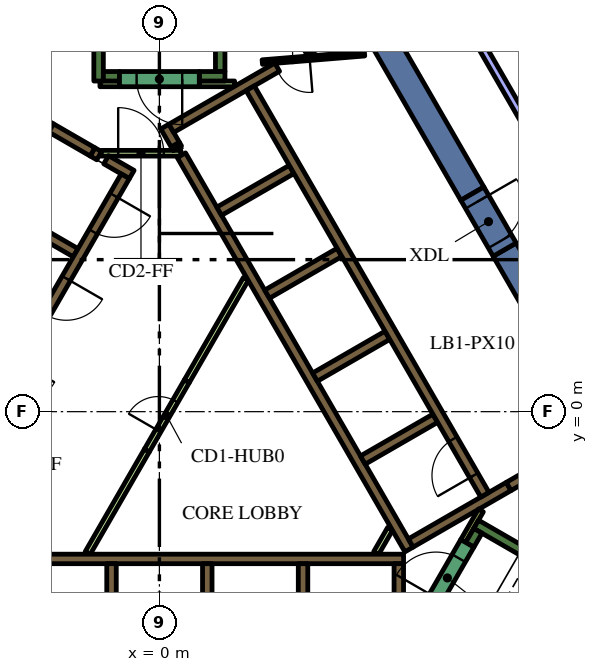
"""IFC4 building model, lengths in metres.
Left out: names, types, materials, properties, quantities, classifications, styles, units other than length and angle.
Written with IfcOpenShell. Run it as: python <this file> out.ifc"""

import sys

from ifc_helpers import new_model, si_unit, direction, frame, frame_2d, origin, place, context, subcontext, project, spatial, rectangle, extrude, element, fill, save


model = new_model("IFC4")
c1 = context("Model", 3, precision=1e-05, world=origin(), true_north=direction((0.0, 1.0)))
c2 = subcontext(c1, "Body", "Model", "MODEL_VIEW")
j1 = project(units=[si_unit("LENGTHUNIT", "METRE"), si_unit("PLANEANGLEUNIT", "RADIAN")], contexts=[c1])
p1 = place(None, origin())
s1 = spatial("IfcSite", under=j1, at=p1, CompositionType="ELEMENT")
p2 = place(p1, origin())
s2 = spatial("IfcBuilding", under=s1, at=p2, CompositionType="ELEMENT")
p3 = place(p2, frame((0.0, 0.0, 235.2)))
s3 = spatial("IfcBuildingStorey", under=s2, at=p3, CompositionType="ELEMENT", Elevation=235.2)
for number, where, z_axis, x_axis in (
    (1, (9.085, 4.264, 0.0), (0.0, 0.0, 1.0), (0.5, -0.866, 0.0)),
    (2, (8.235, 5.736, 0.0), (0.0, 0.0, 1.0), (-0.5, 0.866, 0.0)),
):
    element("IfcWall", number, at=place(p3, frame(where, z_axis=z_axis, x_axis=x_axis)), inside=s3, PredefinedType="SOLIDWALL", context=c2, shape_type="SweptSolid", body=[
        extrude(rectangle(XDim=12.472, YDim=0.7, at=frame_2d((6.236, 0.0))), origin(), (0.0, 0.0, 1.0), 4.2),
    ])
p4 = place(p3, frame((8.334, -2.964, 0.0), z_axis=(0.0, 0.0, 1.0), x_axis=(0.866016039709, -0.500016218704, 0.0)))
e3 = element("IfcWall", 3, at=p4, inside=s3, PredefinedType="SOLIDWALL", context=c2, shape_type="SweptSolid", body=[
    extrude(rectangle(XDim=7.05, YDim=0.25, at=frame_2d((3.525, 0.0))), origin(), (0.0, 0.0, 1.0), 4.2),
])
p5 = place(p3, frame((8.168, -3.503, 0.0), z_axis=(0.0, 0.0, 1.0), x_axis=(0.49972245349, 0.866185586049, 0.0)))
e4 = element("IfcWall", 4, at=p5, inside=s3, PredefinedType="SOLIDWALL", context=c2, shape_type="SweptSolid", body=[
    extrude(rectangle(XDim=0.425, YDim=0.25, at=frame_2d((0.212, 0.0))), origin(), (0.0, 0.0, 1.0), 4.2),
])
p6 = place(p3, frame((1.6, 8.95, 0.0), z_axis=(0.0, 0.0, 1.0), x_axis=(0.0, 1.0, 0.0)))
e5 = element("IfcWall", 5, at=p6, inside=s3, PredefinedType="SOLIDWALL", context=c2, shape_type="SweptSolid", body=[
    extrude(rectangle(XDim=6.8, YDim=0.25, at=frame_2d((3.4, 0.0))), origin(), (0.0, 0.0, 1.0), 4.2),
])
p7 = place(p3, frame((1.05, 8.825, 0.0), z_axis=(0.0, 0.0, 1.0), x_axis=(1.0, 0.0, 0.0)))
e6 = element("IfcWall", 6, at=p7, inside=s3, PredefinedType="SOLIDWALL", context=c2, shape_type="SweptSolid", body=[
    extrude(rectangle(XDim=0.675, YDim=0.25, at=frame_2d((0.337, 0.0))), origin(), (0.0, 0.0, 1.0), 4.2),
])
p8 = place(p3, frame((-1.6, 8.7, 0.0), z_axis=(0.0, 0.0, 1.0), x_axis=(0.0, 1.0, 0.0)))
e7 = element("IfcWall", 7, at=p8, inside=s3, PredefinedType="SOLIDWALL", context=c2, shape_type="SweptSolid", body=[
    extrude(rectangle(XDim=7.05, YDim=0.25, at=frame_2d((3.525, 0.0))), origin(), (0.0, 0.0, 1.0), 4.2),
])
p9 = place(p3, frame((-1.475, 8.825, 0.0), z_axis=(0.0, 0.0, 1.0), x_axis=(1.0, 0.0, 0.0)))
e8 = element("IfcWall", 8, at=p9, inside=s3, PredefinedType="SOLIDWALL", context=c2, shape_type="SweptSolid", body=[
    extrude(rectangle(XDim=0.425, YDim=0.25, at=frame_2d((0.212, 0.0))), origin(), (0.0, 0.0, 1.0), 4.2),
])
p10 = place(p3, frame((-5.545, -3.875, 0.0), z_axis=(0.0, 0.0, 1.0), x_axis=(1.0, 0.0, 0.0)))
e9 = element("IfcWall", 9, at=p10, inside=s3, PredefinedType="SOLIDWALL", context=c2, shape_type="SweptSolid", body=[
    extrude(rectangle(XDim=11.97, YDim=0.25, at=frame_2d((5.985, 0.0))), origin(), (0.0, 0.0, 1.0), 4.2),
])
p11 = place(p3, frame((6.3, -7.24, 0.0), z_axis=(0.0, 0.0, 1.0), x_axis=(0.0, 1.0, 0.0)))
e10 = element("IfcWall", 10, at=p11, inside=s3, PredefinedType="SOLIDWALL", context=c2, shape_type="SweptSolid", body=[
    extrude(rectangle(XDim=3.24, YDim=0.25, at=frame_2d((1.62, 0.0))), origin(), (0.0, 0.0, 1.0), 4.2),
])
for number, where, z_axis, x_axis in (
    (11, (3.78, -4.0, 0.0), (0.0, 0.0, 1.0), (0.0, -1.0, 0.0)),
    (12, (1.26, -4.0, 0.0), (0.0, 0.0, 1.0), (0.0, -1.0, 0.0)),
    (13, (-1.26, -4.0, 0.0), (0.0, 0.0, 1.0), (0.0, -1.0, 0.0)),
):
    element("IfcWall", number, at=place(p3, frame(where, z_axis=z_axis, x_axis=x_axis)), inside=s3, PredefinedType="SOLIDWALL", context=c2, shape_type="SweptSolid", body=[
        extrude(rectangle(XDim=2.2, YDim=0.25, at=frame_2d((1.1, 0.0))), origin(), (0.0, 0.0, 1.0), 4.2),
    ])
p12 = place(p3, frame((0.473, 6.93, 0.0), z_axis=(0.0, 0.0, 1.0), x_axis=(-0.49972245349, 0.866185586049, 0.0)))
e14 = element("IfcWall", 14, at=p12, inside=s3, PredefinedType="SOLIDWALL", context=c2, shape_type="SweptSolid", body=[
    extrude(rectangle(XDim=0.11, YDim=0.25, at=frame_2d((0.055, 0.0))), origin(), (0.0, 0.0, 1.0), 4.2),
])
p13 = place(p3, frame((6.568, -3.627, 0.0), z_axis=(0.0, 0.0, 1.0), x_axis=(-0.499999455981, 0.866025717874, 0.0)))
e15 = element("IfcWall", 15, at=p13, inside=s3, PredefinedType="SOLIDWALL", context=c2, shape_type="SweptSolid", body=[
    extrude(rectangle(XDim=11.978, YDim=0.25, at=frame_2d((5.989, 0.0))), origin(), (0.0, 0.0, 1.0), 4.2),
])
p14 = place(p3, frame((0.417, 7.027, 0.0), z_axis=(0.0, 0.0, 1.0), x_axis=(-0.500210807569, 0.865903659763, 0.0)))
e16 = element("IfcWall", 16, at=p14, inside=s3, PredefinedType="SOLIDWALL", context=c2, shape_type="SweptSolid", body=[
    extrude(rectangle(XDim=0.548, YDim=0.25, at=frame_2d((0.274, 0.0))), origin(), (0.0, 0.0, 1.0), 4.2),
])
p15 = place(p3, frame((3.1, 9.064, 0.0), z_axis=(0.0, 0.0, 1.0), x_axis=(-0.866030133475, -0.499991807846, 0.0)))
e17 = element("IfcWall", 17, at=p15, inside=s3, PredefinedType="SOLIDWALL", context=c2, shape_type="SweptSolid", body=[
    extrude(rectangle(XDim=3.217, YDim=0.25, at=frame_2d((1.608, 0.0))), origin(), (0.0, 0.0, 1.0), 4.2),
])
p16 = place(p3, frame((1.574, 5.274, 0.0), z_axis=(0.0, 0.0, 1.0), x_axis=(0.866028486751, 0.499994660107, 0.0)))
e18 = element("IfcWall", 18, at=p16, inside=s3, PredefinedType="SOLIDWALL", context=c2, shape_type="SweptSolid", body=[
    extrude(rectangle(XDim=2.2, YDim=0.25, at=frame_2d((1.1, 0.0))), origin(), (0.0, 0.0, 1.0), 4.2),
])
for number, where, z_axis, x_axis in (
    (19, (2.834, 3.091, 0.0), (0.0, 0.0, 1.0), (0.866, 0.5, 0.0)),
    (20, (4.094, 0.909, 0.0), (0.0, 0.0, 1.0), (0.866, 0.5, 0.0)),
    (21, (5.354, -1.274, 0.0), (0.0, 0.0, 1.0), (0.866, 0.5, 0.0)),
):
    element("IfcWall", number, at=place(p3, frame(where, z_axis=z_axis, x_axis=x_axis)), inside=s3, PredefinedType="SOLIDWALL", context=c2, shape_type="SweptSolid", body=[
        extrude(rectangle(XDim=2.2, YDim=0.25, at=frame_2d((1.1, 0.0))), origin(), (0.0, 0.0, 1.0), 4.2),
    ])
p17 = place(p3, frame((6.614, -3.456, 0.0), z_axis=(0.0, 0.0, 1.0), x_axis=(0.866032512851, 0.499987686533, 0.0)))
e22 = element("IfcWall", 22, at=p17, inside=s3, PredefinedType="SOLIDWALL", context=c2, shape_type="SweptSolid", body=[
    extrude(rectangle(XDim=2.975, YDim=0.25, at=frame_2d((1.487, 0.0))), origin(), (0.0, 0.0, 1.0), 4.2),
])
p18 = place(p3, frame((3.83, 9.486, 0.0), z_axis=(0.0, 0.0, 1.0), x_axis=(0.865986202621, 0.500067892261, 0.0)))
e23 = element("IfcWall", 23, at=p18, inside=s3, PredefinedType="SOLIDWALL", context=c2, shape_type="SweptSolid", body=[
    extrude(rectangle(XDim=1.591, YDim=0.25, at=frame_2d((0.795, 0.0))), origin(), (0.0, 0.0, 1.0), 4.2),
])
p19 = place(p3, frame((-8.06, -1.311, 0.0), z_axis=(0.0, 0.0, 1.0), x_axis=(0.50000273126, 0.866023826885, 0.0)))
e24 = element("IfcWall", 24, at=p19, inside=s3, PredefinedType="SOLIDWALL", context=c2, shape_type="SweptSolid", body=[
    extrude(rectangle(XDim=10.33, YDim=0.25, at=frame_2d((5.165, 0.0))), origin(), (0.0, 0.0, 1.0), 4.2),
])
p20 = place(p3, frame((-1.758, 6.835, 0.0), z_axis=(0.0, 0.0, 1.0), x_axis=(0.865982457891, -0.500074377092, 0.0)))
e25 = element("IfcWall", 25, at=p20, inside=s3, PredefinedType="SOLIDWALL", context=c2, shape_type="SweptSolid", body=[
    extrude(rectangle(XDim=0.2, YDim=0.25, at=frame_2d((0.1, 0.0))), origin(), (0.0, 0.0, 1.0), 4.2),
])
p21 = place(p3, frame((-1.76, 6.836, 0.0), z_axis=(0.0, 0.0, 1.0), x_axis=(-0.865952863304, 0.500125622755, 0.0)))
e26 = element("IfcWall", 26, at=p21, inside=s3, PredefinedType="SOLIDWALL", context=c2, shape_type="SweptSolid", body=[
    extrude(rectangle(XDim=1.258, YDim=0.25, at=frame_2d((0.629, 0.0))), origin(), (0.0, 0.0, 1.0), 4.2),
])
p22 = place(p3, frame((-0.728, 6.24, 0.0), z_axis=(0.0, 0.0, 1.0), x_axis=(-0.865955664968, 0.500120771724, 0.0)))
e27 = element("IfcWall", 27, at=p22, inside=s3, PredefinedType="SOLIDWALL", context=c2, shape_type="SweptSolid", body=[
    extrude(rectangle(XDim=0.778, YDim=0.25, at=frame_2d((0.389, 0.0))), origin(), (0.0, 0.0, 1.0), 4.2),
])
p23 = place(p3, frame((-2.204, 4.182, 0.0), z_axis=(0.0, 0.0, 1.0), x_axis=(-0.866008176907, 0.50002983664, 0.0)))
e28 = element("IfcWall", 28, at=p23, inside=s3, PredefinedType="SOLIDWALL", context=c2, shape_type="SweptSolid", body=[
    extrude(rectangle(XDim=2.2, YDim=0.25, at=frame_2d((1.1, 0.0))), origin(), (0.0, 0.0, 1.0), 4.2),
])
p24 = place(p3, frame((1.05, 8.625, 0.0), z_axis=(0.0, 0.0, 1.0), x_axis=(1.0, 0.0, 0.0)))
e29 = element("IfcWall", 29, at=p24, inside=s3, PredefinedType="PARTITIONING", context=c2, shape_type="SweptSolid", body=[
    extrude(rectangle(XDim=0.929, YDim=0.15, at=frame_2d((0.464, 0.0))), origin(), (0.0, 0.0, 1.0), 3.45),
])
p25 = place(p3, frame((-1.564, 8.625, 0.0), z_axis=(0.0, 0.0, 1.0), x_axis=(1.0, 0.0, 0.0)))
e30 = element("IfcWall", 30, at=p25, inside=s3, PredefinedType="PARTITIONING", context=c2, shape_type="SweptSolid", body=[
    extrude(rectangle(XDim=0.514, YDim=0.15, at=frame_2d((0.257, 0.0))), origin(), (0.0, 0.0, 1.0), 3.45),
])
p26 = place(p3, frame((8.459, -2.599, 0.0), z_axis=(0.0, 0.0, 1.0), x_axis=(-0.500041054325, -0.866001699761, 0.0)))
e31 = element("IfcWall", 31, at=p26, inside=s3, PredefinedType="PARTITIONING", context=c2, shape_type="SweptSolid", body=[
    extrude(rectangle(XDim=0.929, YDim=0.15, at=frame_2d((0.464, 0.0))), origin(), (0.0, 0.0, 1.0), 4.2),
])
p27 = place(p3, frame((5.705, -3.718, 0.0), z_axis=(0.0, 0.0, 1.0), x_axis=(0.499962090823, 0.866047289552, 0.0)))
e32 = element("IfcWall", 32, at=p27, inside=s3, PredefinedType="PARTITIONING", context=c2, shape_type="SweptSolid", body=[
    extrude(rectangle(XDim=0.735, YDim=0.15, at=frame_2d((0.367, 0.0))), origin(), (0.0, 0.0, 1.0), 3.45),
])
p28 = place(p3, frame((-1.887, -3.718, 0.0), z_axis=(0.0, 0.0, 1.0), x_axis=(0.500043732237, 0.866000153493, 0.0)))
e33 = element("IfcWall", 33, at=p28, inside=s3, PredefinedType="PARTITIONING", context=c2, shape_type="SweptSolid", body=[
    extrude(rectangle(XDim=3.114, YDim=0.15, at=frame_2d((1.557, 0.0))), origin(), (0.0, 0.0, 1.0), 3.45),
])
p29 = place(p3, frame((0.72, 0.797, 0.0), z_axis=(0.0, 0.0, 1.0), x_axis=(0.499984921984, 0.866034108906, 0.0)))
e34 = element("IfcWall", 34, at=p29, inside=s3, PredefinedType="PARTITIONING", context=c2, shape_type="SweptSolid", body=[
    extrude(rectangle(XDim=3.113, YDim=0.15, at=frame_2d((1.557, 0.0))), origin(), (0.0, 0.0, 1.0), 3.45),
])
p30 = place(p3, frame((8.565, -2.185, 0.0), z_axis=(0.0, 0.0, 1.0), x_axis=(-0.499997954832, 0.866026584559, 0.0)))
e35 = element("IfcWall", 35, at=p30, inside=s3, PredefinedType="SOLIDWALL", context=c2, shape_type="SweptSolid", body=[
    extrude(rectangle(XDim=12.35, YDim=0.25, at=frame_2d((6.175, 0.0))), origin(), (0.0, 0.0, 1.0), 4.2),
])
p31 = place(p30, frame((0.585, 0.0, 0.0)))
e36 = element("IfcOpeningElement", 36, at=p31, cuts=e35, PredefinedType="OPENING", context=c2, shape_type="SweptSolid", body=[
    extrude(rectangle(XDim=1.1, YDim=2.1, at=frame_2d((0.55, 1.05))), frame((0.0, 0.135, 0.0), z_axis=(0.0, -1.0, 0.0), x_axis=(1.0, 0.0, 0.0)), (0.0, 0.0, 1.0), 0.27),
])
p32 = place(p3, frame((-0.898, 6.194, 0.0), z_axis=(0.0, 0.0, 1.0), x_axis=(-0.499996202215, -0.866027596426, 0.0)))
e37 = element("IfcWall", 37, at=p32, inside=s3, PredefinedType="SOLIDWALL", context=c2, shape_type="SweptSolid", body=[
    extrude(rectangle(XDim=9.83, YDim=0.25, at=frame_2d((4.915, 0.0))), origin(), (0.0, 0.0, 1.0), 4.2),
])
p33 = place(p32, frame((0.585, 0.0, 0.0)))
e38 = element("IfcOpeningElement", 38, at=p33, cuts=e37, PredefinedType="OPENING", context=c2, shape_type="SweptSolid", body=[
    extrude(rectangle(XDim=1.1, YDim=2.1, at=frame_2d((0.55, 1.05))), frame((0.0, 0.135, 0.0), z_axis=(0.0, -1.0, 0.0), x_axis=(1.0, 0.0, 0.0)), (0.0, 0.0, 1.0), 0.27),
])
p34 = place(p32, frame((3.105, 0.0, 0.0)))
e39 = element("IfcOpeningElement", 39, at=p34, cuts=e37, PredefinedType="OPENING", context=c2, shape_type="SweptSolid", body=[
    extrude(rectangle(XDim=1.1, YDim=2.1, at=frame_2d((0.55, 1.05))), frame((0.0, 0.135, 0.0), z_axis=(0.0, -1.0, 0.0), x_axis=(1.0, 0.0, 0.0)), (0.0, 0.0, 1.0), 0.27),
])
p35 = place(p32, frame((5.625, 0.0, 0.0)))
e40 = element("IfcOpeningElement", 40, at=p35, cuts=e37, PredefinedType="OPENING", context=c2, shape_type="SweptSolid", body=[
    extrude(rectangle(XDim=1.1, YDim=2.1, at=frame_2d((0.55, 1.05))), frame((0.0, 0.135, 0.0), z_axis=(0.0, -1.0, 0.0), x_axis=(1.0, 0.0, 0.0)), (0.0, 0.0, 1.0), 0.27),
])
p36 = place(p32, frame((8.145, 0.0, 0.0)))
e41 = element("IfcOpeningElement", 41, at=p36, cuts=e37, PredefinedType="OPENING", context=c2, shape_type="SweptSolid", body=[
    extrude(rectangle(XDim=1.1, YDim=2.1, at=frame_2d((0.55, 1.05))), frame((0.0, 0.135, 0.0), z_axis=(0.0, -1.0, 0.0), x_axis=(1.0, 0.0, 0.0)), (0.0, 0.0, 1.0), 0.27),
])
p37 = place(p3, frame((7.053, -5.284, 0.0), z_axis=(0.0, 0.0, 1.0), x_axis=(0.500078061341, 0.865980330357, 0.0)))
e42 = element("IfcWall", 42, at=p37, inside=s3, PredefinedType="SOLIDWALL", context=c2, shape_type="SweptSolid", body=[
    extrude(rectangle(XDim=2.1, YDim=0.4, at=frame_2d((1.05, 0.0))), origin(), (0.0, 0.0, 1.0), 4.2),
])
p38 = place(p37, frame((0.45, 0.0, 0.0)))
e43 = element("IfcOpeningElement", 43, at=p38, cuts=e42, PredefinedType="OPENING", context=c2, shape_type="SweptSolid", body=[
    extrude(rectangle(XDim=1.2, YDim=2.1, at=frame_2d((0.6, 1.05))), frame((0.0, 0.21, 0.0), z_axis=(0.0, -1.0, 0.0), x_axis=(1.0, 0.0, 0.0)), (0.0, 0.0, 1.0), 0.42),
])
p39 = place(p3, frame((1.05, 8.75, 0.0), z_axis=(0.0, 0.0, 1.0), x_axis=(-1.0, 0.0, 0.0)))
e44 = element("IfcWall", 44, at=p39, inside=s3, PredefinedType="SOLIDWALL", context=c2, shape_type="SweptSolid", body=[
    extrude(rectangle(XDim=2.1, YDim=0.4, at=frame_2d((1.05, 0.0))), origin(), (0.0, 0.0, 1.0), 4.2),
])
p40 = place(p39, frame((0.45, 0.0, 0.0)))
e45 = element("IfcOpeningElement", 45, at=p40, cuts=e44, PredefinedType="OPENING", context=c2, shape_type="SweptSolid", body=[
    extrude(rectangle(XDim=1.2, YDim=2.1, at=frame_2d((0.6, 1.05))), frame((0.0, 0.21, 0.0), z_axis=(0.0, -1.0, 0.0), x_axis=(1.0, 0.0, 0.0)), (0.0, 0.0, 1.0), 0.42),
])
p41 = place(p3, frame((5.398, 9.419, 0.0), z_axis=(0.0, 0.0, 1.0), x_axis=(-0.996653416376, -0.081743303248, 0.0)))
e46 = element("IfcWall", 46, at=p41, inside=s3, PredefinedType="PARTITIONING", context=c2, shape_type="SweptSolid", body=[
    extrude(rectangle(XDim=2.7, YDim=0.12, at=frame_2d((1.35, 0.0))), origin(), (0.0, 0.0, 1.0), 3.45),
])
p42 = place(p41, frame((1.45, 0.0, 0.0)))
e47 = element("IfcOpeningElement", 47, at=p42, cuts=e46, PredefinedType="OPENING", context=c2, shape_type="SweptSolid", body=[
    extrude(rectangle(XDim=0.9, YDim=2.1, at=frame_2d((0.45, 1.05))), frame((0.0, 0.07, 0.0), z_axis=(0.0, -1.0, 0.0), x_axis=(1.0, 0.0, 0.0)), (0.0, 0.0, 1.0), 0.14),
])
p43 = place(p3, frame((-0.33, -1.022, 0.0), z_axis=(0.0, 0.0, 1.0), x_axis=(0.500027713859, 0.866009402589, 0.0)))
e48 = element("IfcWall", 48, at=p43, inside=s3, PredefinedType="PARTITIONING", context=c2, shape_type="SweptSolid", body=[
    extrude(rectangle(XDim=2.1, YDim=0.15, at=frame_2d((1.05, 0.0))), origin(), (0.0, 0.0, 1.0), 3.45),
])
p44 = place(p43, frame((0.6, 0.0, 0.0)))
e49 = element("IfcOpeningElement", 49, at=p44, cuts=e48, PredefinedType="OPENING", context=c2, shape_type="SweptSolid", body=[
    extrude(rectangle(XDim=0.9, YDim=2.1, at=frame_2d((0.45, 1.05))), frame((0.0, 0.085, 0.0), z_axis=(0.0, -1.0, 0.0), x_axis=(1.0, 0.0, 0.0)), (0.0, 0.0, 1.0), 0.17),
])
p45 = place(p3, frame((-1.534, 6.8, 0.0), z_axis=(0.0, 0.0, 1.0), x_axis=(1.0, 0.0, 0.0)))
e50 = element("IfcWall", 50, at=p45, inside=s3, PredefinedType="PARTITIONING", context=c2, shape_type="SweptSolid", body=[
    extrude(rectangle(XDim=2.1, YDim=0.15, at=frame_2d((1.05, 0.0))), origin(), (0.0, 0.0, 1.0), 3.45),
])
p46 = place(p45, frame((0.45, 0.0, 0.0)))
e51 = element("IfcOpeningElement", 51, at=p46, cuts=e50, PredefinedType="OPENING", context=c2, shape_type="SweptSolid", body=[
    extrude(rectangle(XDim=1.2, YDim=2.1, at=frame_2d((0.6, 1.05))), frame((0.0, 0.085, 0.0), z_axis=(0.0, -1.0, 0.0), x_axis=(1.0, 0.0, 0.0)), (0.0, 0.0, 1.0), 0.17),
])
p47 = place(p3, frame((11.009, -0.919, 0.0), z_axis=(0.0, 0.0, 1.0), x_axis=(-0.866059744384, -0.49994051562, 0.0)))
e52 = element("IfcWall", 52, at=p47, inside=s3, PredefinedType="SOLIDWALL", context=c2, shape_type="SweptSolid", body=[
    extrude(rectangle(XDim=2.1, YDim=0.25, at=frame_2d((1.05, 0.0))), origin(), (0.0, 0.0, 1.0), 4.2),
])
p48 = place(p47, frame((0.45, 0.0, 0.0)))
e53 = element("IfcOpeningElement", 53, at=p48, cuts=e52, PredefinedType="OPENING", context=c2, shape_type="SweptSolid", body=[
    extrude(rectangle(XDim=1.2, YDim=2.1, at=frame_2d((0.6, 1.05))), frame((0.0, 0.135, 0.0), z_axis=(0.0, -1.0, 0.0), x_axis=(1.0, 0.0, 0.0)), (0.0, 0.0, 1.0), 0.27),
])
p49 = place(p3, frame((8.235, 5.736, 0.0), z_axis=(0.0, 0.0, 1.0), x_axis=(0.499954529098, -0.86605165483, 0.0)))
e54 = element("IfcWall", 54, at=p49, inside=s3, PredefinedType="SOLIDWALL", context=c2, shape_type="SweptSolid", body=[
    extrude(rectangle(XDim=1.7, YDim=0.7, at=frame_2d((0.85, 0.0))), origin(), (0.0, 0.0, 1.0), 4.2),
])
p50 = place(p49, frame((0.25, 0.0, 0.0)))
e55 = element("IfcOpeningElement", 55, at=p50, cuts=e54, PredefinedType="OPENING", context=c2, shape_type="SweptSolid", body=[
    extrude(rectangle(XDim=1.2, YDim=2.1, at=frame_2d((0.6, 1.05))), frame((0.0, 0.36, 0.0), z_axis=(0.0, -1.0, 0.0), x_axis=(1.0, 0.0, 0.0)), (0.0, 0.0, 1.0), 0.72),
])
p51 = place(p3, frame((10.472, 6.162, 0.0), z_axis=(0.0, 0.0, 1.0), x_axis=(-0.499988222896, 0.866032203192, 0.0)))
e56 = element("IfcWall", 56, at=p51, inside=s3, PredefinedType="PARTITIONING", context=c2, shape_type="SweptSolid", body=[
    extrude(rectangle(XDim=4.4, YDim=0.2, at=frame_2d((2.2, 0.0))), origin(), (0.0, 0.0, 1.0), 3.45),
])
p52 = place(p31, origin())
e57 = element("IfcDoor", 57, at=p52, inside=s3, OperationType="DOUBLE_DOOR_SLIDING", PredefinedType="DOOR", context=c2, shape_type="SweptSolid", body=[
    extrude(rectangle(XDim=1.1, YDim=2.1, at=frame_2d((0.55, 1.05))), frame((0.0, 0.025, 0.0), z_axis=(0.0, -1.0, 0.0), x_axis=(1.0, 0.0, 0.0)), (0.0, 0.0, 1.0), 0.05),
])
fill(e36, e57)
p53 = place(p33, origin())
e58 = element("IfcDoor", 58, at=p53, inside=s3, OperationType="DOUBLE_DOOR_SLIDING", PredefinedType="DOOR", context=c2, shape_type="SweptSolid", body=[
    extrude(rectangle(XDim=1.1, YDim=2.1, at=frame_2d((0.55, 1.05))), frame((0.0, 0.025, 0.0), z_axis=(0.0, -1.0, 0.0), x_axis=(1.0, 0.0, 0.0)), (0.0, 0.0, 1.0), 0.05),
])
fill(e38, e58)
p54 = place(p34, origin())
e59 = element("IfcDoor", 59, at=p54, inside=s3, OperationType="DOUBLE_DOOR_SLIDING", PredefinedType="DOOR", context=c2, shape_type="SweptSolid", body=[
    extrude(rectangle(XDim=1.1, YDim=2.1, at=frame_2d((0.55, 1.05))), frame((0.0, 0.025, 0.0), z_axis=(0.0, -1.0, 0.0), x_axis=(1.0, 0.0, 0.0)), (0.0, 0.0, 1.0), 0.05),
])
fill(e39, e59)
p55 = place(p38, origin())
e60 = element("IfcDoor", 60, at=p55, inside=s3, OperationType="SINGLE_SWING_LEFT", PredefinedType="DOOR", context=c2, shape_type="SweptSolid", body=[
    extrude(rectangle(XDim=1.2, YDim=2.1, at=frame_2d((0.6, 1.05))), frame((0.0, 0.025, 0.0), z_axis=(0.0, -1.0, 0.0), x_axis=(1.0, 0.0, 0.0)), (0.0, 0.0, 1.0), 0.05),
])
fill(e43, e60)
p56 = place(p40, origin())
e61 = element("IfcDoor", 61, at=p56, inside=s3, OperationType="SINGLE_SWING_LEFT", PredefinedType="DOOR", context=c2, shape_type="SweptSolid", body=[
    extrude(rectangle(XDim=1.2, YDim=2.1, at=frame_2d((0.6, 1.05))), frame((0.0, 0.025, 0.0), z_axis=(0.0, -1.0, 0.0), x_axis=(1.0, 0.0, 0.0)), (0.0, 0.0, 1.0), 0.05),
])
fill(e45, e61)
p57 = place(p42, origin())
e62 = element("IfcDoor", 62, at=p57, inside=s3, OperationType="SINGLE_SWING_LEFT", PredefinedType="DOOR", context=c2, shape_type="SweptSolid", body=[
    extrude(rectangle(XDim=0.9, YDim=2.1, at=frame_2d((0.45, 1.05))), frame((0.0, 0.025, 0.0), z_axis=(0.0, -1.0, 0.0), x_axis=(1.0, 0.0, 0.0)), (0.0, 0.0, 1.0), 0.05),
])
fill(e47, e62)
p58 = place(p44, origin())
e63 = element("IfcDoor", 63, at=p58, inside=s3, OperationType="SINGLE_SWING_LEFT", PredefinedType="DOOR", context=c2, shape_type="SweptSolid", body=[
    extrude(rectangle(XDim=0.9, YDim=2.1, at=frame_2d((0.45, 1.05))), frame((0.0, 0.025, 0.0), z_axis=(0.0, -1.0, 0.0), x_axis=(1.0, 0.0, 0.0)), (0.0, 0.0, 1.0), 0.05),
])
fill(e49, e63)
p59 = place(p46, origin())
e64 = element("IfcDoor", 64, at=p59, inside=s3, OperationType="SINGLE_SWING_LEFT", PredefinedType="DOOR", context=c2, shape_type="SweptSolid", body=[
    extrude(rectangle(XDim=1.2, YDim=2.1, at=frame_2d((0.6, 1.05))), frame((0.0, 0.025, 0.0), z_axis=(0.0, -1.0, 0.0), x_axis=(1.0, 0.0, 0.0)), (0.0, 0.0, 1.0), 0.05),
])
fill(e51, e64)
p60 = place(p50, origin())
e65 = element("IfcDoor", 65, at=p60, inside=s3, OperationType="SINGLE_SWING_LEFT", PredefinedType="DOOR", context=c2, shape_type="SweptSolid", body=[
    extrude(rectangle(XDim=1.2, YDim=2.1, at=frame_2d((0.6, 1.05))), frame((0.0, 0.025, 0.0), z_axis=(0.0, -1.0, 0.0), x_axis=(1.0, 0.0, 0.0)), (0.0, 0.0, 1.0), 0.05),
])
fill(e55, e65)
save(model, sys.argv[1])
